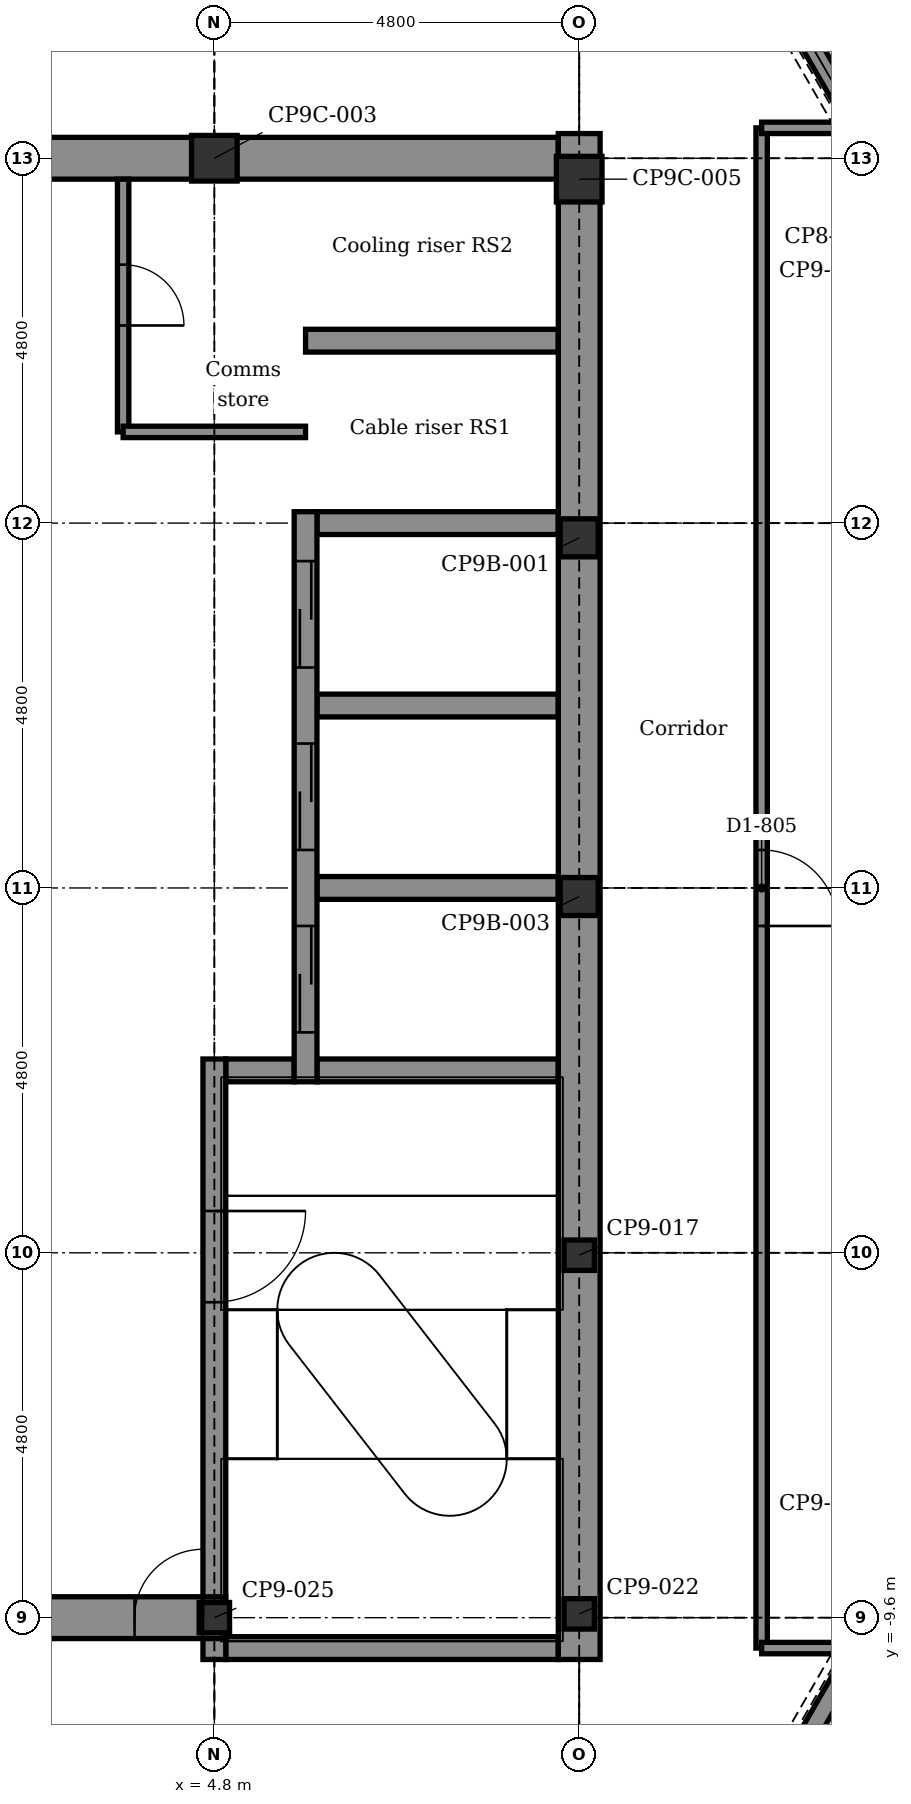
"""IFC4 building model, lengths in metres.
Left out: names, types, materials, properties, quantities, classifications, styles, units other than length and angle.
Written with IfcOpenShell. Run it as: python <this file> out.ifc"""

import sys

from ifc_helpers import new_model, si_unit, direction, frame, frame_2d, origin, origin_2d, place, context, subcontext, project, spatial, polyline, rectangle, hollow_rectangle, outline, extrude, element, fill, save


model = new_model("IFC4")
c1 = context("Model", 3, precision=1e-05, world=origin(), true_north=direction((0.0, 1.0)))
c2 = subcontext(c1, "Body", "Model", "MODEL_VIEW")
j1 = project(units=[si_unit("LENGTHUNIT", "METRE"), si_unit("PLANEANGLEUNIT", "RADIAN")], contexts=[c1])
p1 = place(None, origin())
s1 = spatial("IfcSite", under=j1, at=p1, CompositionType="ELEMENT")
p2 = place(p1, origin())
s2 = spatial("IfcBuilding", under=s1, at=p2, CompositionType="ELEMENT")
p3 = place(p2, frame((0.0, 0.0, 301.9)))
s3 = spatial("IfcBuildingStorey", under=s2, at=p3, CompositionType="ELEMENT", Elevation=301.9)
p4 = place(p3, frame((4.95, -10.0, -0.3), z_axis=(0.0, 0.0, 1.0), x_axis=(1.0, 0.0, 0.0)))
e1 = element("IfcWall", 1, at=p4, inside=s3, PredefinedType="STANDARD", context=c2, shape_type="SweptSolid", body=[
    extrude(rectangle(XDim=4.375, YDim=0.3, at=frame_2d((2.188, 0.0))), origin(), (0.0, 0.0, 1.0), 5.3),
])
p5 = place(p3, frame((-5.25, -9.6, -0.3), z_axis=(0.0, 0.0, 1.0), x_axis=(1.0, 0.0, 0.0)))
e2 = element("IfcWall", 2, at=p5, inside=s3, PredefinedType="SHEAR", context=c2, shape_type="SweptSolid", body=[
    extrude(rectangle(XDim=10.2, YDim=0.55, at=frame_2d((5.1, 0.0))), origin(), (0.0, 0.0, 1.0), 5.3),
])
p6 = place(p5, frame((9.0, 0.0, 0.3)))
e3 = element("IfcOpeningElement", 3, at=p6, cuts=e2, PredefinedType="OPENING", context=c2, shape_type="SweptSolid", body=[
    extrude(rectangle(XDim=0.9, YDim=2.1, at=frame_2d((0.45, 1.05))), frame((0.0, 0.285, 0.0), z_axis=(0.0, -1.0, 0.0), x_axis=(1.0, 0.0, 0.0)), (0.0, 0.0, 1.0), 0.57),
])
p7 = place(p3, frame((4.95, -2.4, -0.3), z_axis=(0.0, 0.0, 1.0), x_axis=(1.0, 0.0, 0.0)))
e4 = element("IfcWall", 4, at=p7, inside=s3, PredefinedType="STANDARD", context=c2, shape_type="SweptSolid", body=[
    extrude(rectangle(XDim=0.9, YDim=0.3, at=frame_2d((0.45, 0.0))), origin(), (0.0, 0.0, 1.0), 5.3),
])
p8 = place(p3, frame((6.15, -2.4, -0.3), z_axis=(0.0, 0.0, 1.0), x_axis=(1.0, 0.0, 0.0)))
e5 = element("IfcWall", 5, at=p8, inside=s3, PredefinedType="STANDARD", context=c2, shape_type="SweptSolid", body=[
    extrude(rectangle(XDim=3.175, YDim=0.3, at=frame_2d((1.587, 0.0))), origin(), (0.0, 0.0, 1.0), 5.3),
])
for number, where, z_axis, x_axis in (
    (6, (6.15, 0.0, -0.3), (0.0, 0.0, 1.0), (1.0, 0.0, 0.0)),
    (7, (6.15, 2.4, -0.3), (0.0, 0.0, 1.0), (1.0, 0.0, 0.0)),
):
    element("IfcWall", number, at=place(p3, frame(where, z_axis=z_axis, x_axis=x_axis)), inside=s3, PredefinedType="STANDARD", context=c2, shape_type="SweptSolid", body=[
        extrude(rectangle(XDim=3.175, YDim=0.3, at=frame_2d((1.587, 0.0))), origin(), (0.0, 0.0, 1.0), 4.7),
    ])
p9 = place(p3, frame((6.15, 4.8, -0.3), z_axis=(0.0, 0.0, 1.0), x_axis=(1.0, 0.0, 0.0)))
e8 = element("IfcWall", 8, at=p9, inside=s3, PredefinedType="STANDARD", context=c2, shape_type="SweptSolid", body=[
    extrude(rectangle(XDim=3.175, YDim=0.3, at=frame_2d((1.587, 0.0))), origin(), (0.0, 0.0, 1.0), 5.3),
])
p10 = place(p3, frame((6.0, 7.2, -0.3), z_axis=(0.0, 0.0, 1.0), x_axis=(1.0, 0.0, 0.0)))
e9 = element("IfcWall", 9, at=p10, inside=s3, PredefinedType="STANDARD", context=c2, shape_type="SweptSolid", body=[
    extrude(rectangle(XDim=3.325, YDim=0.3, at=frame_2d((1.663, 0.0))), origin(), (0.0, 0.0, 1.0), 5.3),
])
p11 = place(p3, frame((-5.25, 9.6, -0.3), z_axis=(0.0, 0.0, 1.0), x_axis=(1.0, 0.0, 0.0)))
e10 = element("IfcWall", 10, at=p11, inside=s3, PredefinedType="SHEAR", context=c2, shape_type="SweptSolid", body=[
    extrude(rectangle(XDim=14.575, YDim=0.55, at=frame_2d((7.288, 0.0))), origin(), (0.0, 0.0, 1.0), 5.3),
])
p12 = place(p11, frame((0.6, 0.0, 0.3)))
e11 = element("IfcOpeningElement", 11, at=p12, cuts=e10, PredefinedType="OPENING", context=c2, shape_type="SweptSolid", body=[
    extrude(rectangle(XDim=0.9, YDim=2.1, at=frame_2d((0.45, 1.05))), frame((0.0, 0.285, 0.0), z_axis=(0.0, -1.0, 0.0), x_axis=(1.0, 0.0, 0.0)), (0.0, 0.0, 1.0), 0.57),
])
p13 = place(p3, frame((4.8, -10.15, -0.3), z_axis=(0.0, 0.0, 1.0), x_axis=(0.0, 1.0, 0.0)))
e12 = element("IfcWall", 12, at=p13, inside=s3, PredefinedType="STANDARD", context=c2, shape_type="SweptSolid", body=[
    extrude(rectangle(XDim=0.275, YDim=0.3, at=frame_2d((0.137, 0.0))), origin(), (0.0, 0.0, 1.0), 5.3),
])
p14 = place(p3, frame((4.8, -9.325, -0.3), z_axis=(0.0, 0.0, 1.0), x_axis=(0.0, 1.0, 0.0)))
e13 = element("IfcWall", 13, at=p14, inside=s3, PredefinedType="STANDARD", context=c2, shape_type="SweptSolid", body=[
    extrude(rectangle(XDim=7.075, YDim=0.3, at=frame_2d((3.538, 0.0))), origin(), (0.0, 0.0, 1.0), 5.3),
])
p15 = place(p14, frame((3.875, 0.0, 0.3)))
e14 = element("IfcOpeningElement", 14, at=p15, cuts=e13, PredefinedType="OPENING", context=c2, shape_type="SweptSolid", body=[
    extrude(rectangle(XDim=1.2, YDim=2.1, at=frame_2d((0.6, 1.05))), frame((0.0, 0.16, 0.0), z_axis=(0.0, -1.0, 0.0), x_axis=(1.0, 0.0, 0.0)), (0.0, 0.0, 1.0), 0.32),
])
p16 = place(p3, frame((6.0, -2.55, -0.3), z_axis=(0.0, 0.0, 1.0), x_axis=(0.0, 1.0, 0.0)))
e15 = element("IfcWall", 15, at=p16, inside=s3, PredefinedType="STANDARD", context=c2, shape_type="SweptSolid", body=[
    extrude(rectangle(XDim=7.5, YDim=0.3, at=frame_2d((3.75, 0.0))), origin(), (0.0, 0.0, 1.0), 4.7),
])
p17 = place(p16, frame((0.65, 0.0, 0.3)))
e16 = element("IfcOpeningElement", 16, at=p17, cuts=e15, PredefinedType="OPENING", context=c2, shape_type="SweptSolid", body=[
    extrude(rectangle(XDim=1.4, YDim=2.1, at=frame_2d((0.7, 1.05))), frame((0.0, 0.16, 0.0), z_axis=(0.0, -1.0, 0.0), x_axis=(1.0, 0.0, 0.0)), (0.0, 0.0, 1.0), 0.32),
])
p18 = place(p16, frame((3.05, 0.0, 0.3)))
e17 = element("IfcOpeningElement", 17, at=p18, cuts=e15, PredefinedType="OPENING", context=c2, shape_type="SweptSolid", body=[
    extrude(rectangle(XDim=1.4, YDim=2.1, at=frame_2d((0.7, 1.05))), frame((0.0, 0.16, 0.0), z_axis=(0.0, -1.0, 0.0), x_axis=(1.0, 0.0, 0.0)), (0.0, 0.0, 1.0), 0.32),
])
p19 = place(p16, frame((5.45, 0.0, 0.3)))
e18 = element("IfcOpeningElement", 18, at=p19, cuts=e15, PredefinedType="OPENING", context=c2, shape_type="SweptSolid", body=[
    extrude(rectangle(XDim=1.4, YDim=2.1, at=frame_2d((0.7, 1.05))), frame((0.0, 0.16, 0.0), z_axis=(0.0, -1.0, 0.0), x_axis=(1.0, 0.0, 0.0)), (0.0, 0.0, 1.0), 0.32),
])
p20 = place(p3, frame((9.6, -10.15, -0.3), z_axis=(0.0, 0.0, 1.0), x_axis=(0.0, 1.0, 0.0)))
e19 = element("IfcWall", 19, at=p20, inside=s3, PredefinedType="SHEAR", context=c2, shape_type="SweptSolid", body=[
    extrude(rectangle(XDim=20.075, YDim=0.55, at=frame_2d((10.038, 0.0))), origin(), (0.0, 0.0, 1.0), 5.3),
])
p21 = place(p3, frame((4.8, -9.6, 5.0), z_axis=(0.0, 0.0, 1.0), x_axis=(1.0, 0.0, 0.0)))
e20 = element("IfcColumn", 20, at=p21, inside=s3, PredefinedType="COLUMN", context=c2, shape_type="SweptSolid", body=[
    extrude(hollow_rectangle(XDim=0.4, YDim=0.4, WallThickness=0.02, at=origin_2d()), origin(), (0.0, 0.0, 1.0), 2.917),
])
p22 = place(p3, frame((4.8, 9.6, 5.0), z_axis=(0.0, 0.0, 1.0), x_axis=(1.0, 0.0, 0.0)))
e21 = element("IfcColumn", 21, at=p22, inside=s3, PredefinedType="COLUMN", context=c2, shape_type="SweptSolid", body=[
    extrude(hollow_rectangle(XDim=0.6, YDim=0.6, WallThickness=0.032, at=origin_2d()), origin(), (0.0, 0.0, 1.0), 14.915),
])
p23 = place(p3, frame((9.6, -9.55, 5.0), z_axis=(0.0, 0.0, 1.0), x_axis=(1.0, 0.0, 0.0)))
e22 = element("IfcColumn", 22, at=p23, inside=s3, PredefinedType="COLUMN", context=c2, shape_type="SweptSolid", body=[
    extrude(hollow_rectangle(XDim=0.4, YDim=0.4, WallThickness=0.02, at=origin_2d()), origin(), (0.0, 0.0, 1.0), 3.774),
])
p24 = place(p3, frame((9.6, -4.831, 5.0), z_axis=(0.0, 0.0, 1.0), x_axis=(1.0, 0.0, 0.0)))
e23 = element("IfcColumn", 23, at=p24, inside=s3, PredefinedType="COLUMN", context=c2, shape_type="SweptSolid", body=[
    extrude(hollow_rectangle(XDim=0.4, YDim=0.4, WallThickness=0.02, at=origin_2d()), origin(), (0.0, 0.0, 1.0), 6.723),
])
p25 = place(p3, frame((9.6, -0.113, 5.0), z_axis=(0.0, 0.0, 1.0), x_axis=(1.0, 0.0, 0.0)))
e24 = element("IfcColumn", 24, at=p25, inside=s3, PredefinedType="COLUMN", context=c2, shape_type="SweptSolid", body=[
    extrude(hollow_rectangle(XDim=0.5, YDim=0.5, WallThickness=0.025, at=origin_2d()), origin(), (0.0, 0.0, 1.0), 9.671),
])
p26 = place(p3, frame((9.6, 4.606, 5.0), z_axis=(0.0, 0.0, 1.0), x_axis=(1.0, 0.0, 0.0)))
e25 = element("IfcColumn", 25, at=p26, inside=s3, PredefinedType="COLUMN", context=c2, shape_type="SweptSolid", body=[
    extrude(hollow_rectangle(XDim=0.5, YDim=0.5, WallThickness=0.025, at=origin_2d()), origin(), (0.0, 0.0, 1.0), 12.62),
])
p27 = place(p3, frame((9.6, 9.325, 5.0), z_axis=(0.0, 0.0, 1.0), x_axis=(1.0, 0.0, 0.0)))
e26 = element("IfcColumn", 26, at=p27, inside=s3, PredefinedType="COLUMN", context=c2, shape_type="SweptSolid", body=[
    extrude(hollow_rectangle(XDim=0.6, YDim=0.6, WallThickness=0.032, at=origin_2d()), origin(), (0.0, 0.0, 1.0), 15.569),
])
p28 = place(p3, frame((10.358, 15.065, 0.0), z_axis=(0.0, 0.0, 1.0), x_axis=(0.500010301671, -0.86601945603, 0.0)))
e27 = element("IfcWall", 27, at=p28, inside=s3, PredefinedType="SOLIDWALL", context=c2, shape_type="SweptSolid", body=[
    extrude(outline(polyline([(0.0, 0.0), (15.736, 0.0), (15.736, 15.994), (0.0, 24.509), (0.0, 0.0)])), frame((0.0, 0.125, 0.0), z_axis=(0.0, -1.0, 0.0), x_axis=(1.0, 0.0, 0.0)), (0.0, 0.0, 1.0), 0.25),
])
p29 = place(p28, frame((4.268, 0.0, 5.8)))
e28 = element("IfcOpeningElement", 28, at=p29, cuts=e27, PredefinedType="OPENING", context=c2, shape_type="SweptSolid", body=[
    extrude(rectangle(XDim=2.4, YDim=3.6, at=frame_2d((1.2, 1.8))), frame((0.0, 0.135, 0.0), z_axis=(0.0, -1.0, 0.0), x_axis=(1.0, 0.0, 0.0)), (0.0, 0.0, 1.0), 0.27),
])
p30 = place(p28, frame((4.268, 0.0, 10.0)))
e29 = element("IfcOpeningElement", 29, at=p30, cuts=e27, PredefinedType="OPENING", context=c2, shape_type="SweptSolid", body=[
    extrude(rectangle(XDim=2.4, YDim=3.6, at=frame_2d((1.2, 1.8))), frame((0.0, 0.135, 0.0), z_axis=(0.0, -1.0, 0.0), x_axis=(1.0, 0.0, 0.0)), (0.0, 0.0, 1.0), 0.27),
])
p31 = place(p28, frame((4.268, 0.0, 14.2)))
e30 = element("IfcOpeningElement", 30, at=p31, cuts=e27, PredefinedType="OPENING", context=c2, shape_type="SweptSolid", body=[
    extrude(rectangle(XDim=2.4, YDim=3.6, at=frame_2d((1.2, 1.8))), frame((0.0, 0.135, 0.0), z_axis=(0.0, -1.0, 0.0), x_axis=(1.0, 0.0, 0.0)), (0.0, 0.0, 1.0), 0.27),
])
p32 = place(p28, frame((9.068, 0.0, 5.8)))
e31 = element("IfcOpeningElement", 31, at=p32, cuts=e27, PredefinedType="OPENING", context=c2, shape_type="SweptSolid", body=[
    extrude(rectangle(XDim=2.4, YDim=3.6, at=frame_2d((1.2, 1.8))), frame((0.0, 0.135, 0.0), z_axis=(0.0, -1.0, 0.0), x_axis=(1.0, 0.0, 0.0)), (0.0, 0.0, 1.0), 0.27),
])
p33 = place(p28, frame((9.068, 0.0, 10.0)))
e32 = element("IfcOpeningElement", 32, at=p33, cuts=e27, PredefinedType="OPENING", context=c2, shape_type="SweptSolid", body=[
    extrude(rectangle(XDim=2.4, YDim=3.6, at=frame_2d((1.2, 1.8))), frame((0.0, 0.135, 0.0), z_axis=(0.0, -1.0, 0.0), x_axis=(1.0, 0.0, 0.0)), (0.0, 0.0, 1.0), 0.27),
])
p34 = place(p28, frame((9.068, 0.0, 1.0)))
e33 = element("IfcOpeningElement", 33, at=p34, cuts=e27, PredefinedType="OPENING", context=c2, shape_type="SweptSolid", body=[
    extrude(rectangle(XDim=2.4, YDim=3.0, at=frame_2d((1.2, 1.5))), frame((0.0, 0.135, 0.0), z_axis=(0.0, -1.0, 0.0), x_axis=(1.0, 0.0, 0.0)), (0.0, 0.0, 1.0), 0.27),
])
p35 = place(p3, frame((18.226, -1.438, 0.0), z_axis=(0.0, 0.0, 1.0), x_axis=(-0.500010301671, -0.86601945603, 0.0)))
e34 = element("IfcWall", 34, at=p35, inside=s3, PredefinedType="SOLIDWALL", context=c2, shape_type="SweptSolid", body=[
    extrude(outline(polyline([(0.0, 0.0), (15.736, 0.0), (15.736, 5.682), (0.0, 14.197), (0.0, 0.0)])), frame((0.0, 0.125, 0.0), z_axis=(0.0, -1.0, 0.0), x_axis=(1.0, 0.0, 0.0)), (0.0, 0.0, 1.0), 0.25),
])
p36 = place(p35, frame((4.268, 0.0, 5.8)))
e35 = element("IfcOpeningElement", 35, at=p36, cuts=e34, PredefinedType="OPENING", context=c2, shape_type="SweptSolid", body=[
    extrude(rectangle(XDim=2.4, YDim=3.6, at=frame_2d((1.2, 1.8))), frame((0.0, 0.135, 0.0), z_axis=(0.0, -1.0, 0.0), x_axis=(1.0, 0.0, 0.0)), (0.0, 0.0, 1.0), 0.27),
])
p37 = place(p35, frame((4.268, 0.0, 1.0)))
e36 = element("IfcOpeningElement", 36, at=p37, cuts=e34, PredefinedType="OPENING", context=c2, shape_type="SweptSolid", body=[
    extrude(rectangle(XDim=2.4, YDim=3.0, at=frame_2d((1.2, 1.5))), frame((0.0, 0.135, 0.0), z_axis=(0.0, -1.0, 0.0), x_axis=(1.0, 0.0, 0.0)), (0.0, 0.0, 1.0), 0.27),
])
p38 = place(p3, frame((12.0, -10.0, 0.0), z_axis=(0.0, 0.0, 1.0), x_axis=(0.0, 1.0, 0.0)))
e37 = element("IfcWall", 37, at=p38, inside=s3, PredefinedType="PARTITIONING", context=c2, shape_type="SweptSolid", body=[
    extrude(rectangle(XDim=20.0, YDim=0.15, at=frame_2d((10.0, 0.0))), origin(), (0.0, 0.0, 1.0), 5.0),
])
p39 = place(p38, frame((9.5, 0.0, 0.0)))
e38 = element("IfcOpeningElement", 38, at=p39, cuts=e37, PredefinedType="OPENING", context=c2, shape_type="SweptSolid", body=[
    extrude(rectangle(XDim=1.0, YDim=2.1, at=frame_2d((0.5, 1.05))), frame((0.0, 0.085, 0.0), z_axis=(0.0, -1.0, 0.0), x_axis=(1.0, 0.0, 0.0)), (0.0, 0.0, 1.0), 0.17),
])
p40 = place(p3, frame((3.6, 6.0, 0.0), z_axis=(0.0, 0.0, 1.0), x_axis=(0.0, 1.0, 0.0)))
e39 = element("IfcWall", 39, at=p40, inside=s3, PredefinedType="PARTITIONING", context=c2, shape_type="SweptSolid", body=[
    extrude(rectangle(XDim=3.325, YDim=0.15, at=frame_2d((1.663, 0.0))), origin(), (0.0, 0.0, 1.0), 5.0),
])
p41 = place(p40, frame((1.4, 0.0, 0.0)))
e40 = element("IfcOpeningElement", 40, at=p41, cuts=e39, PredefinedType="OPENING", context=c2, shape_type="SweptSolid", body=[
    extrude(rectangle(XDim=0.8, YDim=2.1, at=frame_2d((0.4, 1.05))), frame((0.0, 0.085, 0.0), z_axis=(0.0, -1.0, 0.0), x_axis=(1.0, 0.0, 0.0)), (0.0, 0.0, 1.0), 0.17),
])
p42 = place(p3, frame((12.0, -10.0, 0.0), z_axis=(0.0, 0.0, 1.0), x_axis=(1.0, 0.0, 0.0)))
e41 = element("IfcWall", 41, at=p42, inside=s3, PredefinedType="PARTITIONING", context=c2, shape_type="SweptSolid", body=[
    extrude(rectangle(XDim=1.288, YDim=0.15, at=frame_2d((0.644, 0.0))), origin(), (0.0, 0.0, 1.0), 5.0),
])
p43 = place(p3, frame((3.6, 6.0, 0.0), z_axis=(0.0, 0.0, 1.0), x_axis=(1.0, 0.0, 0.0)))
e42 = element("IfcWall", 42, at=p43, inside=s3, PredefinedType="PARTITIONING", context=c2, shape_type="SweptSolid", body=[
    extrude(rectangle(XDim=2.4, YDim=0.15, at=frame_2d((1.2, 0.0))), origin(), (0.0, 0.0, 1.0), 5.0),
])
p44 = place(p3, frame((12.0, 10.0, 0.0), z_axis=(0.0, 0.0, 1.0), x_axis=(1.0, 0.0, 0.0)))
e43 = element("IfcWall", 43, at=p44, inside=s3, PredefinedType="PARTITIONING", context=c2, shape_type="SweptSolid", body=[
    extrude(rectangle(XDim=1.288, YDim=0.15, at=frame_2d((0.644, 0.0))), origin(), (0.0, 0.0, 1.0), 5.0),
])
p45 = place(p41, frame((0.8, 0.0, 0.0), z_axis=(0.0, 0.0, 1.0), x_axis=(-1.0, 0.0, 0.0)))
e44 = element("IfcDoor", 44, at=p45, inside=s3, OperationType="SINGLE_SWING_LEFT", PredefinedType="DOOR", context=c2, shape_type="SweptSolid", body=[
    extrude(rectangle(XDim=0.8, YDim=2.1, at=frame_2d((0.4, 1.05))), frame((0.0, 0.025, 0.0), z_axis=(0.0, -1.0, 0.0), x_axis=(1.0, 0.0, 0.0)), (0.0, 0.0, 1.0), 0.05),
])
fill(e40, e44)
p46 = place(p39, frame((1.0, 0.0, 0.0), z_axis=(0.0, 0.0, 1.0), x_axis=(-1.0, 0.0, 0.0)))
e45 = element("IfcDoor", 45, at=p46, inside=s3, OperationType="SINGLE_SWING_LEFT", PredefinedType="DOOR", context=c2, shape_type="SweptSolid", body=[
    extrude(rectangle(XDim=1.0, YDim=2.1, at=frame_2d((0.5, 1.05))), frame((0.0, 0.025, 0.0), z_axis=(0.0, -1.0, 0.0), x_axis=(1.0, 0.0, 0.0)), (0.0, 0.0, 1.0), 0.05),
])
fill(e38, e45)
p47 = place(p17, origin())
e46 = element("IfcDoor", 46, at=p47, inside=s3, OperationType="DOUBLE_DOOR_SLIDING", PredefinedType="DOOR", context=c2, shape_type="SweptSolid", body=[
    extrude(rectangle(XDim=1.4, YDim=2.1, at=frame_2d((0.7, 1.05))), frame((0.0, 0.025, 0.0), z_axis=(0.0, -1.0, 0.0), x_axis=(1.0, 0.0, 0.0)), (0.0, 0.0, 1.0), 0.05),
])
fill(e16, e46)
p48 = place(p18, origin())
e47 = element("IfcDoor", 47, at=p48, inside=s3, OperationType="DOUBLE_DOOR_SLIDING", PredefinedType="DOOR", context=c2, shape_type="SweptSolid", body=[
    extrude(rectangle(XDim=1.4, YDim=2.1, at=frame_2d((0.7, 1.05))), frame((0.0, 0.025, 0.0), z_axis=(0.0, -1.0, 0.0), x_axis=(1.0, 0.0, 0.0)), (0.0, 0.0, 1.0), 0.05),
])
fill(e17, e47)
p49 = place(p19, origin())
e48 = element("IfcDoor", 48, at=p49, inside=s3, OperationType="DOUBLE_DOOR_SLIDING", PredefinedType="DOOR", context=c2, shape_type="SweptSolid", body=[
    extrude(rectangle(XDim=1.4, YDim=2.1, at=frame_2d((0.7, 1.05))), frame((0.0, 0.025, 0.0), z_axis=(0.0, -1.0, 0.0), x_axis=(1.0, 0.0, 0.0)), (0.0, 0.0, 1.0), 0.05),
])
fill(e18, e48)
p50 = place(p15, frame((1.2, 0.0, 0.0), z_axis=(0.0, 0.0, 1.0), x_axis=(-1.0, 0.0, 0.0)))
e49 = element("IfcDoor", 49, at=p50, inside=s3, OperationType="SINGLE_SWING_RIGHT", PredefinedType="DOOR", context=c2, shape_type="SweptSolid", body=[
    extrude(rectangle(XDim=1.2, YDim=2.1, at=frame_2d((0.6, 1.05))), frame((0.0, 0.025, 0.0), z_axis=(0.0, -1.0, 0.0), x_axis=(1.0, 0.0, 0.0)), (0.0, 0.0, 1.0), 0.05),
])
fill(e14, e49)
p51 = place(p6, origin())
e50 = element("IfcDoor", 50, at=p51, inside=s3, OperationType="SINGLE_SWING_RIGHT", PredefinedType="DOOR", context=c2, shape_type="SweptSolid", body=[
    extrude(rectangle(XDim=0.9, YDim=2.1, at=frame_2d((0.45, 1.05))), frame((0.0, 0.025, 0.0), z_axis=(0.0, -1.0, 0.0), x_axis=(1.0, 0.0, 0.0)), (0.0, 0.0, 1.0), 0.05),
])
fill(e3, e50)
p52 = place(p29, origin())
e51 = element("IfcWindow", 51, at=p52, inside=s3, PartitioningType="SINGLE_PANEL", PredefinedType="WINDOW", context=c2, shape_type="SweptSolid", body=[
    extrude(rectangle(XDim=2.4, YDim=3.6, at=frame_2d((1.2, 1.8))), frame((0.0, 0.03, 0.0), z_axis=(0.0, -1.0, 0.0), x_axis=(1.0, 0.0, 0.0)), (0.0, 0.0, 1.0), 0.06),
])
fill(e28, e51)
p53 = place(p30, origin())
e52 = element("IfcWindow", 52, at=p53, inside=s3, PartitioningType="SINGLE_PANEL", PredefinedType="WINDOW", context=c2, shape_type="SweptSolid", body=[
    extrude(rectangle(XDim=2.4, YDim=3.6, at=frame_2d((1.2, 1.8))), frame((0.0, 0.03, 0.0), z_axis=(0.0, -1.0, 0.0), x_axis=(1.0, 0.0, 0.0)), (0.0, 0.0, 1.0), 0.06),
])
fill(e29, e52)
p54 = place(p31, origin())
e53 = element("IfcWindow", 53, at=p54, inside=s3, PartitioningType="SINGLE_PANEL", PredefinedType="WINDOW", context=c2, shape_type="SweptSolid", body=[
    extrude(rectangle(XDim=2.4, YDim=3.6, at=frame_2d((1.2, 1.8))), frame((0.0, 0.03, 0.0), z_axis=(0.0, -1.0, 0.0), x_axis=(1.0, 0.0, 0.0)), (0.0, 0.0, 1.0), 0.06),
])
fill(e30, e53)
save(model, sys.argv[1])
